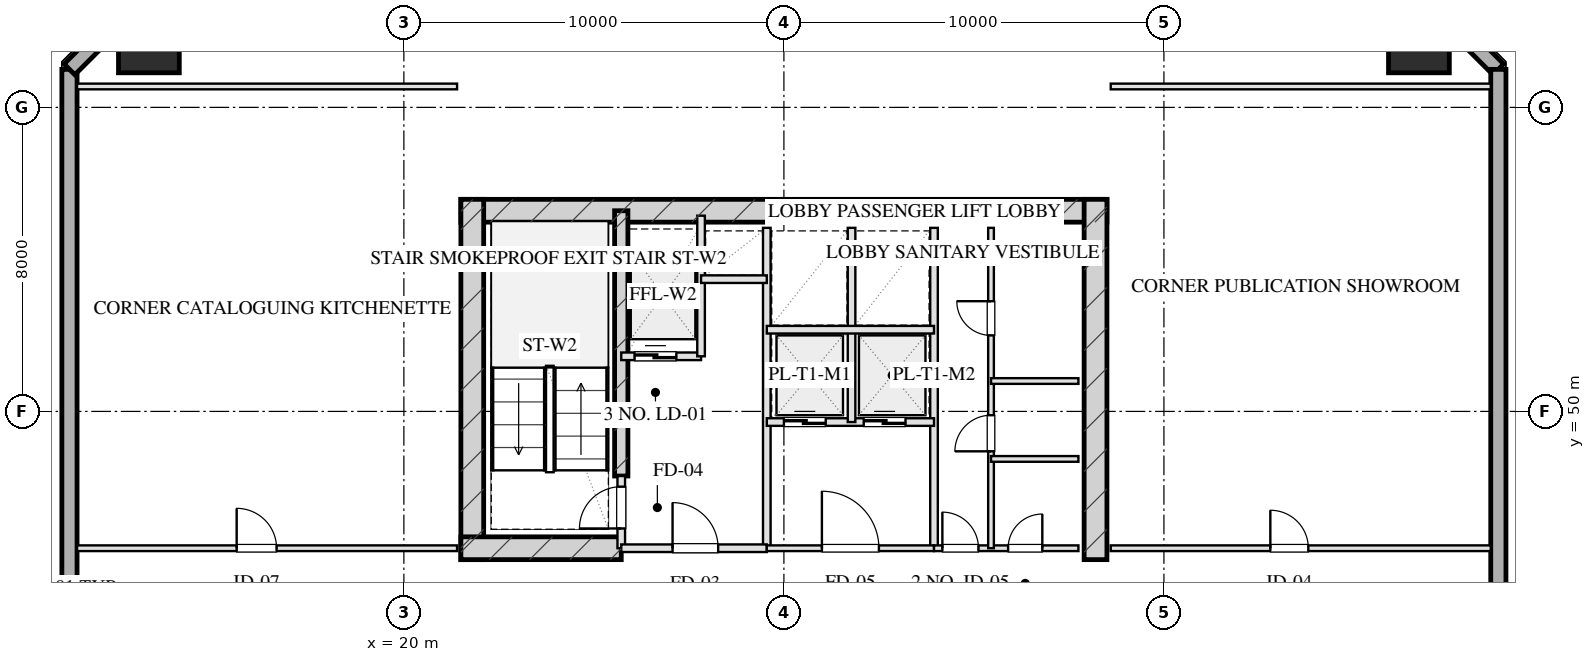
"""IFC4 building model, lengths in metres.
Left out: names, types, materials, properties, quantities, classifications, styles, units other than length and angle.
Written with IfcOpenShell. Run it as: python <this file> out.ifc"""

import sys

from ifc_helpers import new_model, si_unit, direction, frame, frame_2d, origin, origin_2d, place, context, subcontext, project, spatial, rectangle, hollow_rectangle, extrude, element, fill, save


model = new_model("IFC4")
c1 = context("Model", 3, precision=1e-05, world=origin(), true_north=direction((0.0, 1.0)))
c2 = subcontext(c1, "Body", "Model", "MODEL_VIEW")
j1 = project(units=[si_unit("LENGTHUNIT", "METRE"), si_unit("PLANEANGLEUNIT", "RADIAN")], contexts=[c1])
p1 = place(None, origin())
s1 = spatial("IfcSite", under=j1, at=p1, CompositionType="ELEMENT")
p2 = place(p1, origin())
s2 = spatial("IfcBuilding", under=s1, at=p2, CompositionType="ELEMENT")
p3 = place(p2, frame((0.0, 0.0, 124.2)))
s3 = spatial("IfcBuildingStorey", under=s2, at=p3, CompositionType="ELEMENT", Elevation=124.2)
p4 = place(p3, frame((21.5, 55.28, 0.0), z_axis=(0.0, 0.0, 1.0), x_axis=(1.0, 0.0, 0.0)))
e1 = element("IfcWall", 1, at=p4, inside=s3, PredefinedType="SHEAR", context=c2, shape_type="SweptSolid", body=[
    extrude(rectangle(XDim=17.0, YDim=0.6, at=frame_2d((8.5, 0.0))), origin(), (0.0, 0.0, 1.0), 3.45),
])
for number, where, z_axis, x_axis in (
    (2, (21.8, 46.1, 0.0), (0.0, 0.0, 1.0), (0.0, 1.0, 0.0)),
    (3, (38.2, 46.1, 0.0), (0.0, 0.0, 1.0), (0.0, 1.0, 0.0)),
):
    element("IfcWall", number, at=place(p3, frame(where, z_axis=z_axis, x_axis=x_axis)), inside=s3, PredefinedType="SHEAR", context=c2, shape_type="SweptSolid", body=[
        extrude(rectangle(XDim=9.48, YDim=0.6, at=frame_2d((4.74, 0.0))), origin(), (0.0, 0.0, 1.0), 3.45),
    ])
p5 = place(p3, frame((25.72, 48.3, 0.0), z_axis=(0.0, 0.0, 1.0), x_axis=(0.0, 1.0, 0.0)))
e4 = element("IfcWall", 4, at=p5, inside=s3, PredefinedType="SHEAR", context=c2, shape_type="SweptSolid", body=[
    extrude(rectangle(XDim=6.98, YDim=0.35, at=frame_2d((3.49, 0.0))), origin(), (0.0, 0.0, 1.0), 3.45),
])
p6 = place(p3, frame((21.5, 46.4, 0.0), z_axis=(0.0, 0.0, 1.0), x_axis=(1.0, 0.0, 0.0)))
e5 = element("IfcWall", 5, at=p6, inside=s3, PredefinedType="SHEAR", context=c2, shape_type="SweptSolid", body=[
    extrude(rectangle(XDim=4.22, YDim=0.6, at=frame_2d((2.11, 0.0))), origin(), (0.0, 0.0, 1.0), 3.45),
])
for number, where, z_axis, x_axis in (
    (6, (46.71, 59.71, 0.0), (0.0, 0.0, 1.0), (1.0, 0.0, 0.0)),
    (7, (13.29, 59.71, 0.0), (0.0, 0.0, 1.0), (1.0, 0.0, 0.0)),
):
    element("IfcColumn", number, at=place(p3, frame(where, z_axis=z_axis, x_axis=x_axis)), inside=s3, PredefinedType="COLUMN", context=c2, shape_type="SweptSolid", body=[
        extrude(hollow_rectangle(XDim=1.6, YDim=1.6, WallThickness=0.055, at=origin_2d()), origin(), (0.0, 0.0, 1.0), 3.451),
    ])
p7 = place(p3, frame((11.2, 9.0, 0.0), z_axis=(0.0, 0.0, 1.0), x_axis=(0.0, 1.0, 0.0)))
e8 = element("IfcWall", 8, at=p7, inside=s3, PredefinedType="SOLIDWALL", context=c2, shape_type="SweptSolid", body=[
    extrude(rectangle(XDim=50.0, YDim=0.4, at=frame_2d((25.0, 0.0))), origin(), (0.0, 0.0, 1.0), 2.61),
])
p8 = place(p7, frame((30.2, 0.0, 0.75)))
e9 = element("IfcOpeningElement", 9, at=p8, cuts=e8, PredefinedType="OPENING", context=c2, shape_type="SweptSolid", body=[
    extrude(rectangle(XDim=2.4, YDim=1.46, at=frame_2d((1.2, 0.73))), frame((0.0, 0.21, 0.0), z_axis=(0.0, -1.0, 0.0), x_axis=(1.0, 0.0, 0.0)), (0.0, 0.0, 1.0), 0.42),
])
p9 = place(p7, frame((18.65, 0.0, 0.0)))
e10 = element("IfcOpeningElement", 10, at=p9, cuts=e8, PredefinedType="OPENING", context=c2, shape_type="SweptSolid", body=[
    extrude(rectangle(XDim=1.1, YDim=2.15, at=frame_2d((0.55, 1.075))), frame((0.0, 0.21, 0.0), z_axis=(0.0, -1.0, 0.0), x_axis=(1.0, 0.0, 0.0)), (0.0, 0.0, 1.0), 0.42),
])
for number, where, z_axis, x_axis in (
    (11, (11.2, 59.0, 0.0), (0.0, 0.0, 1.0), (0.707, 0.707, 0.0)),
    (12, (46.0, 61.8, 0.0), (0.0, 0.0, 1.0), (0.707, -0.707, 0.0)),
):
    element("IfcWall", number, at=place(p3, frame(where, z_axis=z_axis, x_axis=x_axis)), inside=s3, PredefinedType="SOLIDWALL", context=c2, shape_type="SweptSolid", body=[
        extrude(rectangle(XDim=3.96, YDim=0.4, at=frame_2d((1.98, 0.0))), origin(), (0.0, 0.0, 1.0), 2.61),
    ])
p10 = place(p3, frame((48.8, 59.0, 0.0), z_axis=(0.0, 0.0, 1.0), x_axis=(0.0, -1.0, 0.0)))
e13 = element("IfcWall", 13, at=p10, inside=s3, PredefinedType="SOLIDWALL", context=c2, shape_type="SweptSolid", body=[
    extrude(rectangle(XDim=50.0, YDim=0.4, at=frame_2d((25.0, 0.0))), origin(), (0.0, 0.0, 1.0), 2.61),
])
p11 = place(p10, frame((21.2, 0.0, 0.75)))
e14 = element("IfcOpeningElement", 14, at=p11, cuts=e13, PredefinedType="OPENING", context=c2, shape_type="SweptSolid", body=[
    extrude(rectangle(XDim=2.4, YDim=1.46, at=frame_2d((1.2, 0.73))), frame((0.0, 0.21, 0.0), z_axis=(0.0, -1.0, 0.0), x_axis=(1.0, 0.0, 0.0)), (0.0, 0.0, 1.0), 0.42),
])
p12 = place(p10, frame((30.25, 0.0, 0.0)))
e15 = element("IfcOpeningElement", 15, at=p12, cuts=e13, PredefinedType="OPENING", context=c2, shape_type="SweptSolid", body=[
    extrude(rectangle(XDim=1.1, YDim=2.15, at=frame_2d((0.55, 1.075))), frame((0.0, 0.21, 0.0), z_axis=(0.0, -1.0, 0.0), x_axis=(1.0, 0.0, 0.0)), (0.0, 0.0, 1.0), 0.42),
])
p13 = place(p3, frame((25.72, 46.4, 0.0), z_axis=(0.0, 0.0, 1.0), x_axis=(0.0, 1.0, 0.0)))
e16 = element("IfcWall", 16, at=p13, inside=s3, PredefinedType="PARTITIONING", context=c2, shape_type="SweptSolid", body=[
    extrude(rectangle(XDim=1.9, YDim=0.2, at=frame_2d((0.95, 0.0))), origin(), (0.0, 0.0, 1.0), 3.175),
])
p14 = place(p13, frame((0.52, 0.0, 0.0)))
e17 = element("IfcOpeningElement", 17, at=p14, cuts=e16, PredefinedType="OPENING", context=c2, shape_type="SweptSolid", body=[
    extrude(rectangle(XDim=1.1, YDim=2.05, at=frame_2d((0.55, 1.025))), frame((0.0, 0.11, 0.0), z_axis=(0.0, -1.0, 0.0), x_axis=(1.0, 0.0, 0.0)), (0.0, 0.0, 1.0), 0.22),
])
p15 = place(p3, frame((29.55, 46.4, 0.0), z_axis=(0.0, 0.0, 1.0), x_axis=(0.0, 1.0, 0.0)))
e18 = element("IfcWall", 18, at=p15, inside=s3, PredefinedType="PARTITIONING", context=c2, shape_type="SweptSolid", body=[
    extrude(rectangle(XDim=8.43, YDim=0.2, at=frame_2d((4.215, 0.0))), origin(), (0.0, 0.0, 1.0), 3.175),
])
p16 = place(p3, frame((25.72, 46.4, 0.0), z_axis=(0.0, 0.0, 1.0), x_axis=(1.0, 0.0, 0.0)))
e19 = element("IfcWall", 19, at=p16, inside=s3, PredefinedType="PARTITIONING", context=c2, shape_type="SweptSolid", body=[
    extrude(rectangle(XDim=3.83, YDim=0.2, at=frame_2d((1.915, 0.0))), origin(), (0.0, 0.0, 1.0), 3.175),
])
p17 = place(p16, frame((1.35, 0.0, 0.0)))
e20 = element("IfcOpeningElement", 20, at=p17, cuts=e19, PredefinedType="OPENING", context=c2, shape_type="SweptSolid", body=[
    extrude(rectangle(XDim=1.2, YDim=2.05, at=frame_2d((0.6, 1.025))), frame((0.0, 0.11, 0.0), z_axis=(0.0, -1.0, 0.0), x_axis=(1.0, 0.0, 0.0)), (0.0, 0.0, 1.0), 0.22),
])
p18 = place(p3, frame((25.72, 51.45, 0.0), z_axis=(0.0, 0.0, 1.0), x_axis=(1.0, 0.0, 0.0)))
e21 = element("IfcWall", 21, at=p18, inside=s3, PredefinedType="PARTITIONING", context=c2, shape_type="SweptSolid", body=[
    extrude(rectangle(XDim=2.1, YDim=0.2, at=frame_2d((1.05, 0.0))), origin(), (0.0, 0.0, 1.0), 3.175),
])
p19 = place(p18, frame((0.35, 0.0, 0.0)))
e22 = element("IfcOpeningElement", 22, at=p19, cuts=e21, PredefinedType="OPENING", context=c2, shape_type="SweptSolid", body=[
    extrude(rectangle(XDim=1.1, YDim=2.05, at=frame_2d((0.55, 1.025))), frame((0.0, 0.11, 0.0), z_axis=(0.0, -1.0, 0.0), x_axis=(1.0, 0.0, 0.0)), (0.0, 0.0, 1.0), 0.22),
])
p20 = place(p3, frame((27.82, 51.45, 0.0), z_axis=(0.0, 0.0, 1.0), x_axis=(0.0, 1.0, 0.0)))
e23 = element("IfcWall", 23, at=p20, inside=s3, PredefinedType="PARTITIONING", context=c2, shape_type="SweptSolid", body=[
    extrude(rectangle(XDim=3.7, YDim=0.2, at=frame_2d((1.85, 0.0))), origin(), (0.0, 0.0, 1.0), 3.175),
])
p21 = place(p3, frame((27.82, 53.48, 0.0), z_axis=(0.0, 0.0, 1.0), x_axis=(1.0, 0.0, 0.0)))
e24 = element("IfcWall", 24, at=p21, inside=s3, PredefinedType="PARTITIONING", context=c2, shape_type="SweptSolid", body=[
    extrude(rectangle(XDim=1.73, YDim=0.2, at=frame_2d((0.865, 0.0))), origin(), (0.0, 0.0, 1.0), 3.175),
])
p22 = place(p3, frame((33.95, 46.4, 0.0), z_axis=(0.0, 0.0, 1.0), x_axis=(0.0, 1.0, 0.0)))
e25 = element("IfcWall", 25, at=p22, inside=s3, PredefinedType="PARTITIONING", context=c2, shape_type="SweptSolid", body=[
    extrude(rectangle(XDim=8.43, YDim=0.2, at=frame_2d((4.215, 0.0))), origin(), (0.0, 0.0, 1.0), 3.175),
])
p23 = place(p3, frame((29.55, 46.4, 0.0), z_axis=(0.0, 0.0, 1.0), x_axis=(1.0, 0.0, 0.0)))
e26 = element("IfcWall", 26, at=p23, inside=s3, PredefinedType="PARTITIONING", context=c2, shape_type="SweptSolid", body=[
    extrude(rectangle(XDim=4.4, YDim=0.15, at=frame_2d((2.2, 0.0))), origin(), (0.0, 0.0, 1.0), 3.175),
])
p24 = place(p23, frame((1.45, 0.0, 0.0)))
e27 = element("IfcOpeningElement", 27, at=p24, cuts=e26, PredefinedType="OPENING", context=c2, shape_type="SweptSolid", body=[
    extrude(rectangle(XDim=1.5, YDim=2.05, at=frame_2d((0.75, 1.025))), frame((0.0, 0.085, 0.0), z_axis=(0.0, -1.0, 0.0), x_axis=(1.0, 0.0, 0.0)), (0.0, 0.0, 1.0), 0.17),
])
p25 = place(p3, frame((29.55, 49.72, 0.0), z_axis=(0.0, 0.0, 1.0), x_axis=(1.0, 0.0, 0.0)))
e28 = element("IfcWall", 28, at=p25, inside=s3, PredefinedType="PARTITIONING", context=c2, shape_type="SweptSolid", body=[
    extrude(rectangle(XDim=4.4, YDim=0.2, at=frame_2d((2.2, 0.0))), origin(), (0.0, 0.0, 1.0), 3.175),
])
p26 = place(p25, frame((0.45, 0.0, 0.0)))
e29 = element("IfcOpeningElement", 29, at=p26, cuts=e28, PredefinedType="OPENING", context=c2, shape_type="SweptSolid", body=[
    extrude(rectangle(XDim=1.1, YDim=2.05, at=frame_2d((0.55, 1.025))), frame((0.0, 0.11, 0.0), z_axis=(0.0, -1.0, 0.0), x_axis=(1.0, 0.0, 0.0)), (0.0, 0.0, 1.0), 0.22),
])
p27 = place(p25, frame((2.55, 0.0, 0.0)))
e30 = element("IfcOpeningElement", 30, at=p27, cuts=e28, PredefinedType="OPENING", context=c2, shape_type="SweptSolid", body=[
    extrude(rectangle(XDim=1.1, YDim=2.05, at=frame_2d((0.55, 1.025))), frame((0.0, 0.11, 0.0), z_axis=(0.0, -1.0, 0.0), x_axis=(1.0, 0.0, 0.0)), (0.0, 0.0, 1.0), 0.22),
])
p28 = place(p3, frame((31.78, 49.72, 0.0), z_axis=(0.0, 0.0, 1.0), x_axis=(0.0, 1.0, 0.0)))
e31 = element("IfcWall", 31, at=p28, inside=s3, PredefinedType="PARTITIONING", context=c2, shape_type="SweptSolid", body=[
    extrude(rectangle(XDim=5.11, YDim=0.2, at=frame_2d((2.555, 0.0))), origin(), (0.0, 0.0, 1.0), 3.175),
])
p29 = place(p3, frame((29.55, 52.15, 0.0), z_axis=(0.0, 0.0, 1.0), x_axis=(1.0, 0.0, 0.0)))
e32 = element("IfcWall", 32, at=p29, inside=s3, PredefinedType="PARTITIONING", context=c2, shape_type="SweptSolid", body=[
    extrude(rectangle(XDim=4.4, YDim=0.2, at=frame_2d((2.2, 0.0))), origin(), (0.0, 0.0, 1.0), 3.175),
])
p30 = place(p3, frame((33.95, 46.4, 0.0), z_axis=(0.0, 0.0, 1.0), x_axis=(1.0, 0.0, 0.0)))
e33 = element("IfcWall", 33, at=p30, inside=s3, PredefinedType="PARTITIONING", context=c2, shape_type="SweptSolid", body=[
    extrude(rectangle(XDim=3.8, YDim=0.15, at=frame_2d((1.9, 0.0))), origin(), (0.0, 0.0, 1.0), 3.175),
])
p31 = place(p30, frame((0.22, 0.0, 0.0)))
e34 = element("IfcOpeningElement", 34, at=p31, cuts=e33, PredefinedType="OPENING", context=c2, shape_type="SweptSolid", body=[
    extrude(rectangle(XDim=0.95, YDim=2.05, at=frame_2d((0.475, 1.025))), frame((0.0, 0.085, 0.0), z_axis=(0.0, -1.0, 0.0), x_axis=(1.0, 0.0, 0.0)), (0.0, 0.0, 1.0), 0.17),
])
p32 = place(p30, frame((1.95, 0.0, 0.0)))
e35 = element("IfcOpeningElement", 35, at=p32, cuts=e33, PredefinedType="OPENING", context=c2, shape_type="SweptSolid", body=[
    extrude(rectangle(XDim=0.9, YDim=2.05, at=frame_2d((0.45, 1.025))), frame((0.0, 0.085, 0.0), z_axis=(0.0, -1.0, 0.0), x_axis=(1.0, 0.0, 0.0)), (0.0, 0.0, 1.0), 0.17),
])
p33 = place(p3, frame((35.45, 46.4, 0.0), z_axis=(0.0, 0.0, 1.0), x_axis=(0.0, 1.0, 0.0)))
e36 = element("IfcWall", 36, at=p33, inside=s3, PredefinedType="PARTITIONING", context=c2, shape_type="SweptSolid", body=[
    extrude(rectangle(XDim=8.43, YDim=0.15, at=frame_2d((4.215, 0.0))), origin(), (0.0, 0.0, 1.0), 2.765),
])
p34 = place(p33, frame((2.55, 0.0, 0.0)))
e37 = element("IfcOpeningElement", 37, at=p34, cuts=e36, PredefinedType="OPENING", context=c2, shape_type="SweptSolid", body=[
    extrude(rectangle(XDim=0.95, YDim=2.05, at=frame_2d((0.475, 1.025))), frame((0.0, 0.085, 0.0), z_axis=(0.0, -1.0, 0.0), x_axis=(1.0, 0.0, 0.0)), (0.0, 0.0, 1.0), 0.17),
])
p35 = place(p33, frame((5.6, 0.0, 0.0)))
e38 = element("IfcOpeningElement", 38, at=p35, cuts=e36, PredefinedType="OPENING", context=c2, shape_type="SweptSolid", body=[
    extrude(rectangle(XDim=0.9, YDim=2.05, at=frame_2d((0.45, 1.025))), frame((0.0, 0.085, 0.0), z_axis=(0.0, -1.0, 0.0), x_axis=(1.0, 0.0, 0.0)), (0.0, 0.0, 1.0), 0.17),
])
for number, where, z_axis, x_axis in (
    (39, (35.45, 50.8, 0.0), (0.0, 0.0, 1.0), (1.0, 0.0, 0.0)),
    (40, (35.45, 48.75, 0.0), (0.0, 0.0, 1.0), (1.0, 0.0, 0.0)),
):
    element("IfcWall", number, at=place(p3, frame(where, z_axis=z_axis, x_axis=x_axis)), inside=s3, PredefinedType="PARTITIONING", context=c2, shape_type="SweptSolid", body=[
        extrude(rectangle(XDim=2.3, YDim=0.15, at=frame_2d((1.15, 0.0))), origin(), (0.0, 0.0, 1.0), 3.175),
    ])
p36 = place(p3, frame((11.4, 58.55, 0.0), z_axis=(0.0, 0.0, 1.0), x_axis=(1.0, 0.0, 0.0)))
e41 = element("IfcWall", 41, at=p36, inside=s3, PredefinedType="PARTITIONING", context=c2, shape_type="SweptSolid", body=[
    extrude(rectangle(XDim=10.0, YDim=0.15, at=frame_2d((5.0, 0.0))), origin(), (0.0, 0.0, 1.0), 3.175),
])
p37 = place(p3, frame((11.4, 46.4, 0.0), z_axis=(0.0, 0.0, 1.0), x_axis=(1.0, 0.0, 0.0)))
e42 = element("IfcWall", 42, at=p37, inside=s3, PredefinedType="PARTITIONING", context=c2, shape_type="SweptSolid", body=[
    extrude(rectangle(XDim=10.0, YDim=0.15, at=frame_2d((5.0, 0.0))), origin(), (0.0, 0.0, 1.0), 3.175),
])
p38 = place(p37, frame((4.2, 0.0, 0.0)))
e43 = element("IfcOpeningElement", 43, at=p38, cuts=e42, PredefinedType="OPENING", context=c2, shape_type="SweptSolid", body=[
    extrude(rectangle(XDim=1.05, YDim=2.05, at=frame_2d((0.525, 1.025))), frame((0.0, 0.085, 0.0), z_axis=(0.0, -1.0, 0.0), x_axis=(1.0, 0.0, 0.0)), (0.0, 0.0, 1.0), 0.17),
])
p39 = place(p3, frame((38.6, 58.55, 0.0), z_axis=(0.0, 0.0, 1.0), x_axis=(1.0, 0.0, 0.0)))
e44 = element("IfcWall", 44, at=p39, inside=s3, PredefinedType="PARTITIONING", context=c2, shape_type="SweptSolid", body=[
    extrude(rectangle(XDim=10.0, YDim=0.15, at=frame_2d((5.0, 0.0))), origin(), (0.0, 0.0, 1.0), 3.175),
])
p40 = place(p3, frame((38.6, 46.4, 0.0), z_axis=(0.0, 0.0, 1.0), x_axis=(1.0, 0.0, 0.0)))
e45 = element("IfcWall", 45, at=p40, inside=s3, PredefinedType="PARTITIONING", context=c2, shape_type="SweptSolid", body=[
    extrude(rectangle(XDim=10.0, YDim=0.15, at=frame_2d((5.0, 0.0))), origin(), (0.0, 0.0, 1.0), 3.175),
])
p41 = place(p40, frame((4.2, 0.0, 0.0)))
e46 = element("IfcOpeningElement", 46, at=p41, cuts=e45, PredefinedType="OPENING", context=c2, shape_type="SweptSolid", body=[
    extrude(rectangle(XDim=1.0, YDim=2.05, at=frame_2d((0.5, 1.025))), frame((0.0, 0.085, 0.0), z_axis=(0.0, -1.0, 0.0), x_axis=(1.0, 0.0, 0.0)), (0.0, 0.0, 1.0), 0.17),
])
p42 = place(p14, origin())
e47 = element("IfcDoor", 47, at=p42, inside=s3, OperationType="SINGLE_SWING_LEFT", PredefinedType="DOOR", context=c2, shape_type="SweptSolid", body=[
    extrude(rectangle(XDim=1.1, YDim=2.05, at=frame_2d((0.55, 1.025))), frame((0.0, 0.025, 0.0), z_axis=(0.0, -1.0, 0.0), x_axis=(1.0, 0.0, 0.0)), (0.0, 0.0, 1.0), 0.05),
])
fill(e17, e47)
p43 = place(p17, origin())
e48 = element("IfcDoor", 48, at=p43, inside=s3, OperationType="SINGLE_SWING_LEFT", PredefinedType="DOOR", context=c2, shape_type="SweptSolid", body=[
    extrude(rectangle(XDim=1.2, YDim=2.05, at=frame_2d((0.6, 1.025))), frame((0.0, 0.025, 0.0), z_axis=(0.0, -1.0, 0.0), x_axis=(1.0, 0.0, 0.0)), (0.0, 0.0, 1.0), 0.05),
])
fill(e20, e48)
p44 = place(p19, origin())
e49 = element("IfcDoor", 49, at=p44, inside=s3, OperationType="DOUBLE_DOOR_SLIDING", PredefinedType="DOOR", context=c2, shape_type="SweptSolid", body=[
    extrude(rectangle(XDim=1.1, YDim=2.05, at=frame_2d((0.55, 1.025))), frame((0.0, 0.025, 0.0), z_axis=(0.0, -1.0, 0.0), x_axis=(1.0, 0.0, 0.0)), (0.0, 0.0, 1.0), 0.05),
])
fill(e22, e49)
p45 = place(p24, origin())
e50 = element("IfcDoor", 50, at=p45, inside=s3, OperationType="SINGLE_SWING_LEFT", PredefinedType="DOOR", context=c2, shape_type="SweptSolid", body=[
    extrude(rectangle(XDim=1.5, YDim=2.05, at=frame_2d((0.75, 1.025))), frame((0.0, 0.025, 0.0), z_axis=(0.0, -1.0, 0.0), x_axis=(1.0, 0.0, 0.0)), (0.0, 0.0, 1.0), 0.05),
])
fill(e27, e50)
p46 = place(p26, origin())
e51 = element("IfcDoor", 51, at=p46, inside=s3, OperationType="DOUBLE_DOOR_SLIDING", PredefinedType="DOOR", context=c2, shape_type="SweptSolid", body=[
    extrude(rectangle(XDim=1.1, YDim=2.05, at=frame_2d((0.55, 1.025))), frame((0.0, 0.025, 0.0), z_axis=(0.0, -1.0, 0.0), x_axis=(1.0, 0.0, 0.0)), (0.0, 0.0, 1.0), 0.05),
])
fill(e29, e51)
p47 = place(p27, origin())
e52 = element("IfcDoor", 52, at=p47, inside=s3, OperationType="DOUBLE_DOOR_SLIDING", PredefinedType="DOOR", context=c2, shape_type="SweptSolid", body=[
    extrude(rectangle(XDim=1.1, YDim=2.05, at=frame_2d((0.55, 1.025))), frame((0.0, 0.025, 0.0), z_axis=(0.0, -1.0, 0.0), x_axis=(1.0, 0.0, 0.0)), (0.0, 0.0, 1.0), 0.05),
])
fill(e30, e52)
p48 = place(p31, origin())
e53 = element("IfcDoor", 53, at=p48, inside=s3, OperationType="SINGLE_SWING_LEFT", PredefinedType="DOOR", context=c2, shape_type="SweptSolid", body=[
    extrude(rectangle(XDim=0.95, YDim=2.05, at=frame_2d((0.475, 1.025))), frame((0.0, 0.025, 0.0), z_axis=(0.0, -1.0, 0.0), x_axis=(1.0, 0.0, 0.0)), (0.0, 0.0, 1.0), 0.05),
])
fill(e34, e53)
p49 = place(p32, origin())
e54 = element("IfcDoor", 54, at=p49, inside=s3, OperationType="SINGLE_SWING_RIGHT", PredefinedType="DOOR", context=c2, shape_type="SweptSolid", body=[
    extrude(rectangle(XDim=0.9, YDim=2.05, at=frame_2d((0.45, 1.025))), frame((0.0, 0.025, 0.0), z_axis=(0.0, -1.0, 0.0), x_axis=(1.0, 0.0, 0.0)), (0.0, 0.0, 1.0), 0.05),
])
fill(e35, e54)
p50 = place(p34, origin())
e55 = element("IfcDoor", 55, at=p50, inside=s3, OperationType="SINGLE_SWING_LEFT", PredefinedType="DOOR", context=c2, shape_type="SweptSolid", body=[
    extrude(rectangle(XDim=0.95, YDim=2.05, at=frame_2d((0.475, 1.025))), frame((0.0, 0.025, 0.0), z_axis=(0.0, -1.0, 0.0), x_axis=(1.0, 0.0, 0.0)), (0.0, 0.0, 1.0), 0.05),
])
fill(e37, e55)
p51 = place(p35, origin())
e56 = element("IfcDoor", 56, at=p51, inside=s3, OperationType="SINGLE_SWING_RIGHT", PredefinedType="DOOR", context=c2, shape_type="SweptSolid", body=[
    extrude(rectangle(XDim=0.9, YDim=2.05, at=frame_2d((0.45, 1.025))), frame((0.0, 0.025, 0.0), z_axis=(0.0, -1.0, 0.0), x_axis=(1.0, 0.0, 0.0)), (0.0, 0.0, 1.0), 0.05),
])
fill(e38, e56)
p52 = place(p38, origin())
e57 = element("IfcDoor", 57, at=p52, inside=s3, OperationType="SINGLE_SWING_LEFT", PredefinedType="DOOR", context=c2, shape_type="SweptSolid", body=[
    extrude(rectangle(XDim=1.05, YDim=2.05, at=frame_2d((0.525, 1.025))), frame((0.0, 0.025, 0.0), z_axis=(0.0, -1.0, 0.0), x_axis=(1.0, 0.0, 0.0)), (0.0, 0.0, 1.0), 0.05),
])
fill(e43, e57)
p53 = place(p41, origin())
e58 = element("IfcDoor", 58, at=p53, inside=s3, OperationType="SINGLE_SWING_LEFT", PredefinedType="DOOR", context=c2, shape_type="SweptSolid", body=[
    extrude(rectangle(XDim=1.0, YDim=2.05, at=frame_2d((0.5, 1.025))), frame((0.0, 0.025, 0.0), z_axis=(0.0, -1.0, 0.0), x_axis=(1.0, 0.0, 0.0)), (0.0, 0.0, 1.0), 0.05),
])
fill(e46, e58)
save(model, sys.argv[1])
